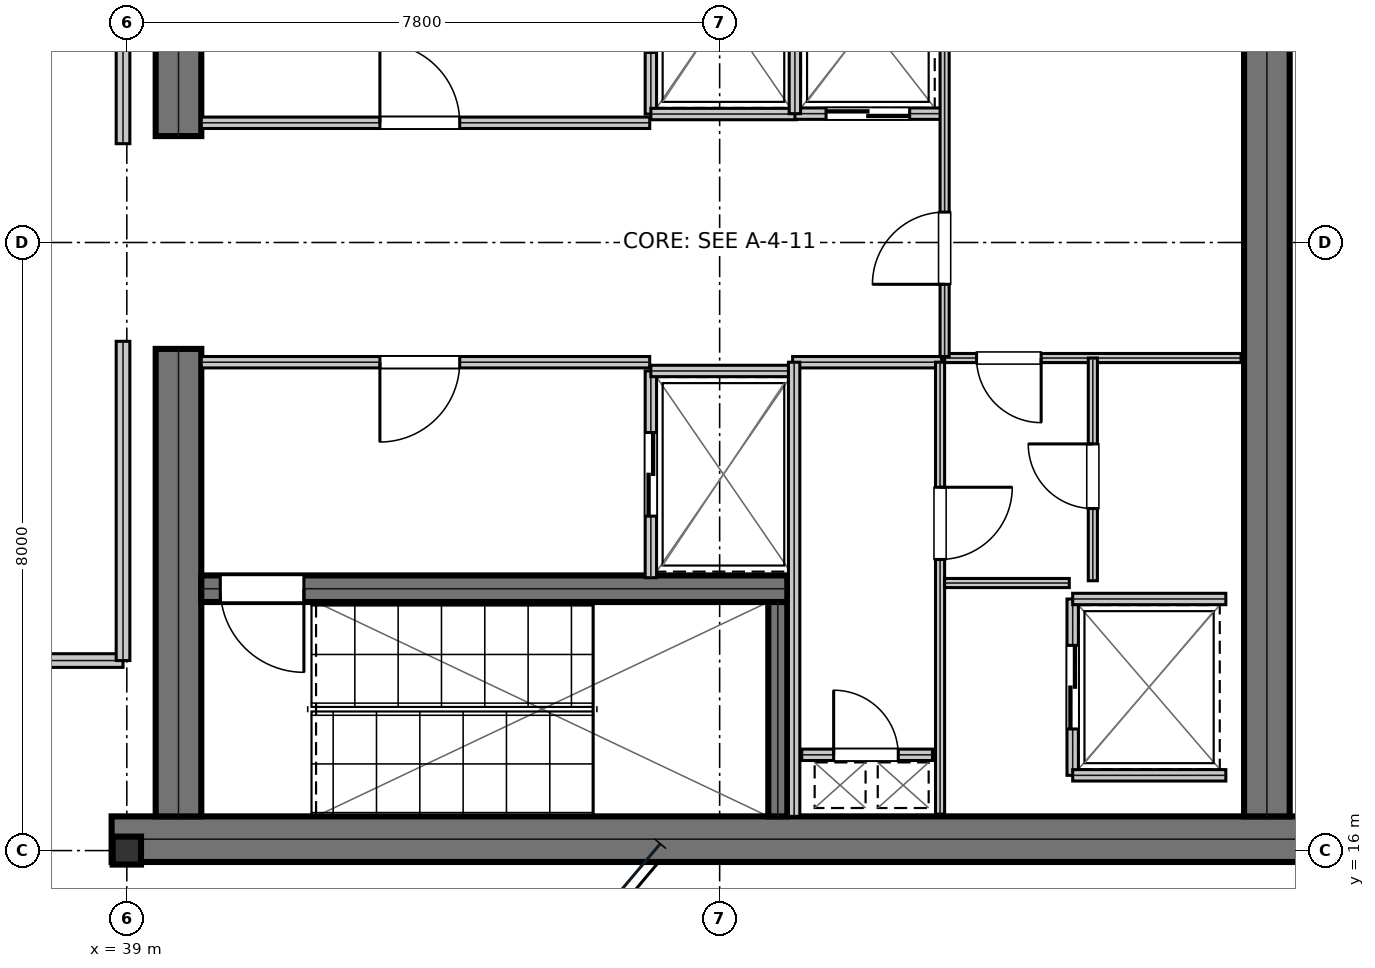
"""IFC4 building model, lengths in metres.
Left out: names, types, materials, properties, quantities, classifications, styles, units other than length and angle.
Written with IfcOpenShell. Run it as: python <this file> out.ifc"""

import sys

from ifc_helpers import new_model, si_unit, direction, frame, frame_2d, origin, origin_2d, place, context, subcontext, project, spatial, rectangle, i_section, extrude, element, fill, save


model = new_model("IFC4")
c1 = context("Model", 3, precision=1e-05, world=origin(), true_north=direction((0.0, 1.0)))
c2 = subcontext(c1, "Body", "Model", "MODEL_VIEW")
j1 = project(units=[si_unit("LENGTHUNIT", "METRE"), si_unit("PLANEANGLEUNIT", "RADIAN")], contexts=[c1])
p1 = place(None, origin())
s1 = spatial("IfcSite", under=j1, at=p1, CompositionType="ELEMENT")
p2 = place(p1, origin())
s2 = spatial("IfcBuilding", under=s1, at=p2, CompositionType="ELEMENT")
p3 = place(p2, frame((0.0, 0.0, 262.05)))
s3 = spatial("IfcBuildingStorey", under=s2, at=p3, CompositionType="ELEMENT", Elevation=262.05)
p4 = place(p3, frame((38.8, 16.15, 0.0), z_axis=(0.0, 0.0, 1.0), x_axis=(1.0, 0.0, 0.0)))
e1 = element("IfcWall", 1, at=p4, inside=s3, PredefinedType="SHEAR", context=c2, shape_type="SweptSolid", body=[
    extrude(rectangle(XDim=16.0, YDim=0.6, at=frame_2d((8.0, 0.0))), origin(), (0.0, 0.0, 1.0), 4.56),
])
for number, where, z_axis, x_axis in (
    (2, (39.68, 16.45, 0.0), (0.0, 0.0, 1.0), (0.0, 1.0, 0.0)),
    (3, (39.68, 25.4, 0.0), (0.0, 0.0, 1.0), (0.0, 1.0, 0.0)),
):
    element("IfcWall", number, at=place(p3, frame(where, z_axis=z_axis, x_axis=x_axis)), inside=s3, PredefinedType="SHEAR", context=c2, shape_type="SweptSolid", body=[
        extrude(rectangle(XDim=6.15, YDim=0.6, at=frame_2d((3.075, 0.0))), origin(), (0.0, 0.0, 1.0), 4.56),
    ])
p5 = place(p3, frame((54.0, 16.45, 0.0), z_axis=(0.0, 0.0, 1.0), x_axis=(0.0, 1.0, 0.0)))
e4 = element("IfcWall", 4, at=p5, inside=s3, PredefinedType="SHEAR", context=c2, shape_type="SweptSolid", body=[
    extrude(rectangle(XDim=15.1, YDim=0.6, at=frame_2d((7.55, 0.0))), origin(), (0.0, 0.0, 1.0), 4.56),
])
p6 = place(p3, frame((39.98, 19.445, 0.0), z_axis=(0.0, 0.0, 1.0), x_axis=(1.0, 0.0, 0.0)))
e5 = element("IfcWall", 5, at=p6, inside=s3, PredefinedType="SHEAR", context=c2, shape_type="SweptSolid", body=[
    extrude(rectangle(XDim=7.71, YDim=0.35, at=frame_2d((3.855, 0.0))), origin(), (0.0, 0.0, 1.0), 4.56),
])
p7 = place(p6, frame((0.25, 0.0, 0.0)))
e6 = element("IfcOpeningElement", 6, at=p7, cuts=e5, PredefinedType="OPENING", context=c2, shape_type="SweptSolid", body=[
    extrude(rectangle(XDim=1.1, YDim=2.15, at=frame_2d((0.55, 1.075))), frame((0.0, 0.185, 0.0), z_axis=(0.0, -1.0, 0.0), x_axis=(1.0, 0.0, 0.0)), (0.0, 0.0, 1.0), 0.37),
])
p8 = place(p3, frame((47.565, 16.45, 0.0), z_axis=(0.0, 0.0, 1.0), x_axis=(0.0, 1.0, 0.0)))
e7 = element("IfcWall", 7, at=p8, inside=s3, PredefinedType="SHEAR", context=c2, shape_type="SweptSolid", body=[
    extrude(rectangle(XDim=2.82, YDim=0.25, at=frame_2d((1.41, 0.0))), origin(), (0.0, 0.0, 1.0), 4.56),
])
p9 = place(p3, frame((39.0, 16.0, 0.0), z_axis=(0.0, 0.0, 1.0), x_axis=(1.0, 0.0, 0.0)))
e8 = element("IfcColumn", 8, at=p9, inside=s3, PredefinedType="COLUMN", context=c2, shape_type="SweptSolid", body=[
    extrude(i_section(OverallWidth=0.373, OverallDepth=0.368, WebThickness=0.015, FlangeThickness=0.024, at=origin_2d()), origin(), (0.0, 0.0, 1.0), 4.794),
])
p10 = place(p3, frame((39.98, 25.575, 0.0), z_axis=(0.0, 0.0, 1.0), x_axis=(1.0, 0.0, 0.0)))
e9 = element("IfcWall", 9, at=p10, inside=s3, PredefinedType="PARTITIONING", context=c2, shape_type="SweptSolid", body=[
    extrude(rectangle(XDim=5.9, YDim=0.15, at=frame_2d((2.95, 0.0))), origin(), (0.0, 0.0, 1.0), 4.56),
])
p11 = place(p10, frame((2.35, 0.0, 0.0)))
e10 = element("IfcOpeningElement", 10, at=p11, cuts=e9, PredefinedType="OPENING", context=c2, shape_type="SweptSolid", body=[
    extrude(rectangle(XDim=1.05, YDim=2.15, at=frame_2d((0.525, 1.075))), frame((0.0, 0.085, 0.0), z_axis=(0.0, -1.0, 0.0), x_axis=(1.0, 0.0, 0.0)), (0.0, 0.0, 1.0), 0.17),
])
p12 = place(p3, frame((39.98, 22.425, 0.0), z_axis=(0.0, 0.0, 1.0), x_axis=(1.0, 0.0, 0.0)))
e11 = element("IfcWall", 11, at=p12, inside=s3, PredefinedType="PARTITIONING", context=c2, shape_type="SweptSolid", body=[
    extrude(rectangle(XDim=5.9, YDim=0.15, at=frame_2d((2.95, 0.0))), origin(), (0.0, 0.0, 1.0), 4.56),
])
p13 = place(p12, frame((2.35, 0.0, 0.0)))
e12 = element("IfcOpeningElement", 12, at=p13, cuts=e11, PredefinedType="OPENING", context=c2, shape_type="SweptSolid", body=[
    extrude(rectangle(XDim=1.05, YDim=2.15, at=frame_2d((0.525, 1.075))), frame((0.0, 0.085, 0.0), z_axis=(0.0, -1.0, 0.0), x_axis=(1.0, 0.0, 0.0)), (0.0, 0.0, 1.0), 0.17),
])
p14 = place(p3, frame((45.895, 25.69, 0.0), z_axis=(0.0, 0.0, 1.0), x_axis=(0.0, 1.0, 0.0)))
e13 = element("IfcWall", 13, at=p14, inside=s3, PredefinedType="PARTITIONING", context=c2, shape_type="SweptSolid", body=[
    extrude(rectangle(XDim=2.72, YDim=0.15, at=frame_2d((1.36, 0.0))), origin(), (0.0, 0.0, 1.0), 4.56),
])
p15 = place(p14, frame((0.81, 0.0, 0.0)))
e14 = element("IfcOpeningElement", 14, at=p15, cuts=e13, PredefinedType="OPENING", context=c2, shape_type="SweptSolid", body=[
    extrude(rectangle(XDim=1.1, YDim=2.15, at=frame_2d((0.55, 1.075))), frame((0.0, 0.085, 0.0), z_axis=(0.0, -1.0, 0.0), x_axis=(1.0, 0.0, 0.0)), (0.0, 0.0, 1.0), 0.17),
])
p16 = place(p3, frame((45.895, 25.69, 0.0), z_axis=(0.0, 0.0, 1.0), x_axis=(1.0, 0.0, 0.0)))
e15 = element("IfcWall", 15, at=p16, inside=s3, PredefinedType="PARTITIONING", context=c2, shape_type="SweptSolid", body=[
    extrude(rectangle(XDim=1.915, YDim=0.15, at=frame_2d((0.958, 0.0))), origin(), (0.0, 0.0, 1.0), 4.56),
])
p17 = place(p3, frame((45.895, 19.59, 0.0), z_axis=(0.0, 0.0, 1.0), x_axis=(0.0, 1.0, 0.0)))
e16 = element("IfcWall", 16, at=p17, inside=s3, PredefinedType="PARTITIONING", context=c2, shape_type="SweptSolid", body=[
    extrude(rectangle(XDim=2.72, YDim=0.15, at=frame_2d((1.36, 0.0))), origin(), (0.0, 0.0, 1.0), 4.56),
])
p18 = place(p17, frame((0.81, 0.0, 0.0)))
e17 = element("IfcOpeningElement", 17, at=p18, cuts=e16, PredefinedType="OPENING", context=c2, shape_type="SweptSolid", body=[
    extrude(rectangle(XDim=1.1, YDim=2.15, at=frame_2d((0.55, 1.075))), frame((0.0, 0.085, 0.0), z_axis=(0.0, -1.0, 0.0), x_axis=(1.0, 0.0, 0.0)), (0.0, 0.0, 1.0), 0.17),
])
p19 = place(p3, frame((45.895, 22.31, 0.0), z_axis=(0.0, 0.0, 1.0), x_axis=(1.0, 0.0, 0.0)))
e18 = element("IfcWall", 18, at=p19, inside=s3, PredefinedType="PARTITIONING", context=c2, shape_type="SweptSolid", body=[
    extrude(rectangle(XDim=1.915, YDim=0.15, at=frame_2d((0.958, 0.0))), origin(), (0.0, 0.0, 1.0), 4.56),
])
p20 = place(p3, frame((47.79, 25.695, 0.0), z_axis=(0.0, 0.0, 1.0), x_axis=(1.0, 0.0, 0.0)))
e19 = element("IfcWall", 19, at=p20, inside=s3, PredefinedType="PARTITIONING", context=c2, shape_type="SweptSolid", body=[
    extrude(rectangle(XDim=1.92, YDim=0.15, at=frame_2d((0.96, 0.0))), origin(), (0.0, 0.0, 1.0), 4.56),
])
p21 = place(p20, frame((0.41, 0.0, 0.0)))
e20 = element("IfcOpeningElement", 20, at=p21, cuts=e19, PredefinedType="OPENING", context=c2, shape_type="SweptSolid", body=[
    extrude(rectangle(XDim=1.1, YDim=2.15, at=frame_2d((0.55, 1.075))), frame((0.0, 0.085, 0.0), z_axis=(0.0, -1.0, 0.0), x_axis=(1.0, 0.0, 0.0)), (0.0, 0.0, 1.0), 0.17),
])
p22 = place(p3, frame((47.79, 25.695, 0.0), z_axis=(0.0, 0.0, 1.0), x_axis=(0.0, 1.0, 0.0)))
e21 = element("IfcWall", 21, at=p22, inside=s3, PredefinedType="PARTITIONING", context=c2, shape_type="SweptSolid", body=[
    extrude(rectangle(XDim=2.415, YDim=0.15, at=frame_2d((1.208, 0.0))), origin(), (0.0, 0.0, 1.0), 4.56),
])
p23 = place(p3, frame((51.445, 16.99, 0.0), z_axis=(0.0, 0.0, 1.0), x_axis=(0.0, 1.0, 0.0)))
e22 = element("IfcWall", 22, at=p23, inside=s3, PredefinedType="PARTITIONING", context=c2, shape_type="SweptSolid", body=[
    extrude(rectangle(XDim=2.32, YDim=0.15, at=frame_2d((1.16, 0.0))), origin(), (0.0, 0.0, 1.0), 4.56),
])
p24 = place(p23, frame((0.61, 0.0, 0.0)))
e23 = element("IfcOpeningElement", 23, at=p24, cuts=e22, PredefinedType="OPENING", context=c2, shape_type="SweptSolid", body=[
    extrude(rectangle(XDim=1.1, YDim=2.15, at=frame_2d((0.55, 1.075))), frame((0.0, 0.085, 0.0), z_axis=(0.0, -1.0, 0.0), x_axis=(1.0, 0.0, 0.0)), (0.0, 0.0, 1.0), 0.17),
])
for number, where, z_axis, x_axis in (
    (24, (51.445, 16.99, 0.0), (0.0, 0.0, 1.0), (1.0, 0.0, 0.0)),
    (25, (51.445, 19.31, 0.0), (0.0, 0.0, 1.0), (1.0, 0.0, 0.0)),
):
    element("IfcWall", number, at=place(p3, frame(where, z_axis=z_axis, x_axis=x_axis)), inside=s3, PredefinedType="PARTITIONING", context=c2, shape_type="SweptSolid", body=[
        extrude(rectangle(XDim=2.015, YDim=0.15, at=frame_2d((1.007, 0.0))), origin(), (0.0, 0.0, 1.0), 4.56),
    ])
p25 = place(p3, frame((47.88, 17.26, 0.0), z_axis=(0.0, 0.0, 1.0), x_axis=(1.0, 0.0, 0.0)))
e26 = element("IfcWall", 26, at=p25, inside=s3, PredefinedType="PARTITIONING", context=c2, shape_type="SweptSolid", body=[
    extrude(rectangle(XDim=1.72, YDim=0.15, at=frame_2d((0.86, 0.0))), origin(), (0.0, 0.0, 1.0), 4.56),
])
p26 = place(p25, frame((0.42, 0.0, 0.0)))
e27 = element("IfcOpeningElement", 27, at=p26, cuts=e26, PredefinedType="OPENING", context=c2, shape_type="SweptSolid", body=[
    extrude(rectangle(XDim=0.85, YDim=2.15, at=frame_2d((0.425, 1.075))), frame((0.0, 0.085, 0.0), z_axis=(0.0, -1.0, 0.0), x_axis=(1.0, 0.0, 0.0)), (0.0, 0.0, 1.0), 0.17),
])
p27 = place(p3, frame((47.76, 22.425, 0.0), z_axis=(0.0, 0.0, 1.0), x_axis=(1.0, 0.0, 0.0)))
e28 = element("IfcWall", 28, at=p27, inside=s3, PredefinedType="PARTITIONING", context=c2, shape_type="SweptSolid", body=[
    extrude(rectangle(XDim=1.96, YDim=0.15, at=frame_2d((0.98, 0.0))), origin(), (0.0, 0.0, 1.0), 4.56),
])
p28 = place(p3, frame((47.78, 16.45, 0.0), z_axis=(0.0, 0.0, 1.0), x_axis=(0.0, 1.0, 0.0)))
e29 = element("IfcWall", 29, at=p28, inside=s3, PredefinedType="PARTITIONING", context=c2, shape_type="SweptSolid", body=[
    extrude(rectangle(XDim=5.975, YDim=0.15, at=frame_2d((2.988, 0.0))), origin(), (0.0, 0.0, 1.0), 4.56),
])
p29 = place(p3, frame((49.7, 16.48, 0.0), z_axis=(0.0, 0.0, 1.0), x_axis=(0.0, 1.0, 0.0)))
e30 = element("IfcWall", 30, at=p29, inside=s3, PredefinedType="PARTITIONING", context=c2, shape_type="SweptSolid", body=[
    extrude(rectangle(XDim=5.945, YDim=0.12, at=frame_2d((2.973, 0.0))), origin(), (0.0, 0.0, 1.0), 4.56),
])
p30 = place(p29, frame((3.35, 0.0, 0.0)))
e31 = element("IfcOpeningElement", 31, at=p30, cuts=e30, PredefinedType="OPENING", context=c2, shape_type="SweptSolid", body=[
    extrude(rectangle(XDim=0.95, YDim=2.15, at=frame_2d((0.475, 1.075))), frame((0.0, 0.07, 0.0), z_axis=(0.0, -1.0, 0.0), x_axis=(1.0, 0.0, 0.0)), (0.0, 0.0, 1.0), 0.14),
])
p31 = place(p3, frame((49.76, 22.48, 0.0), z_axis=(0.0, 0.0, 1.0), x_axis=(1.0, 0.0, 0.0)))
e32 = element("IfcWall", 32, at=p31, inside=s3, PredefinedType="PARTITIONING", context=c2, shape_type="SweptSolid", body=[
    extrude(rectangle(XDim=3.9, YDim=0.12, at=frame_2d((1.95, 0.0))), origin(), (0.0, 0.0, 1.0), 4.56),
])
p32 = place(p31, frame((0.42, 0.0, 0.0)))
e33 = element("IfcOpeningElement", 33, at=p32, cuts=e32, PredefinedType="OPENING", context=c2, shape_type="SweptSolid", body=[
    extrude(rectangle(XDim=0.85, YDim=2.15, at=frame_2d((0.425, 1.075))), frame((0.0, 0.07, 0.0), z_axis=(0.0, -1.0, 0.0), x_axis=(1.0, 0.0, 0.0)), (0.0, 0.0, 1.0), 0.14),
])
p33 = place(p3, frame((51.71, 19.55, 0.0), z_axis=(0.0, 0.0, 1.0), x_axis=(0.0, 1.0, 0.0)))
e34 = element("IfcWall", 34, at=p33, inside=s3, PredefinedType="PARTITIONING", context=c2, shape_type="SweptSolid", body=[
    extrude(rectangle(XDim=2.93, YDim=0.12, at=frame_2d((1.465, 0.0))), origin(), (0.0, 0.0, 1.0), 4.56),
])
p34 = place(p33, frame((0.95, 0.0, 0.0)))
e35 = element("IfcOpeningElement", 35, at=p34, cuts=e34, PredefinedType="OPENING", context=c2, shape_type="SweptSolid", body=[
    extrude(rectangle(XDim=0.85, YDim=2.15, at=frame_2d((0.425, 1.075))), frame((0.0, 0.07, 0.0), z_axis=(0.0, -1.0, 0.0), x_axis=(1.0, 0.0, 0.0)), (0.0, 0.0, 1.0), 0.14),
])
p35 = place(p3, frame((49.76, 19.52, 0.0), z_axis=(0.0, 0.0, 1.0), x_axis=(1.0, 0.0, 0.0)))
e36 = element("IfcWall", 36, at=p35, inside=s3, PredefinedType="PARTITIONING", context=c2, shape_type="SweptSolid", body=[
    extrude(rectangle(XDim=1.64, YDim=0.12, at=frame_2d((0.82, 0.0))), origin(), (0.0, 0.0, 1.0), 4.56),
])
p36 = place(p3, frame((49.76, 22.5, 0.0), z_axis=(0.0, 0.0, 1.0), x_axis=(0.0, 1.0, 0.0)))
e37 = element("IfcWall", 37, at=p36, inside=s3, PredefinedType="PARTITIONING", context=c2, shape_type="SweptSolid", body=[
    extrude(rectangle(XDim=5.72, YDim=0.12, at=frame_2d((2.86, 0.0))), origin(), (0.0, 0.0, 1.0), 4.56),
])
p37 = place(p36, frame((0.95, 0.0, 0.0)))
e38 = element("IfcOpeningElement", 38, at=p37, cuts=e37, PredefinedType="OPENING", context=c2, shape_type="SweptSolid", body=[
    extrude(rectangle(XDim=0.95, YDim=2.15, at=frame_2d((0.475, 1.075))), frame((0.0, 0.07, 0.0), z_axis=(0.0, -1.0, 0.0), x_axis=(1.0, 0.0, 0.0)), (0.0, 0.0, 1.0), 0.14),
])
p38 = place(p3, frame((27.204, 18.5, 0.0), z_axis=(0.0, 0.0, 1.0), x_axis=(1.0, 0.0, 0.0)))
e39 = element("IfcWall", 39, at=p38, inside=s3, PredefinedType="SOLIDWALL", context=c2, shape_type="SweptSolid", body=[
    extrude(rectangle(XDim=11.746, YDim=0.18, at=frame_2d((5.873, 0.0))), origin(), (0.0, 0.0, 1.0), 4.02),
])
p39 = place(p38, frame((5.373, 0.0, 0.0)))
e40 = element("IfcOpeningElement", 40, at=p39, cuts=e39, PredefinedType="OPENING", context=c2, shape_type="SweptSolid", body=[
    extrude(rectangle(XDim=1.0, YDim=2.15, at=frame_2d((0.5, 1.075))), frame((0.0, 0.1, 0.0), z_axis=(0.0, -1.0, 0.0), x_axis=(1.0, 0.0, 0.0)), (0.0, 0.0, 1.0), 0.2),
])
for number, where, z_axis, x_axis in (
    (41, (38.95, 18.5, 0.0), (0.0, 0.0, 1.0), (0.0, 1.0, 0.0)),
    (42, (38.95, 25.3, 0.0), (0.0, 0.0, 1.0), (0.0, 1.0, 0.0)),
):
    element("IfcWall", number, at=place(p3, frame(where, z_axis=z_axis, x_axis=x_axis)), inside=s3, PredefinedType="SOLIDWALL", context=c2, shape_type="SweptSolid", body=[
        extrude(rectangle(XDim=4.2, YDim=0.18, at=frame_2d((2.1, 0.0))), origin(), (0.0, 0.0, 1.0), 4.29),
    ])
p40 = place(p11, origin())
e43 = element("IfcDoor", 43, at=p40, inside=s3, OperationType="SINGLE_SWING_LEFT", PredefinedType="DOOR", context=c2, shape_type="SweptSolid", body=[
    extrude(rectangle(XDim=1.05, YDim=2.15, at=frame_2d((0.525, 1.075))), frame((0.0, 0.025, 0.0), z_axis=(0.0, -1.0, 0.0), x_axis=(1.0, 0.0, 0.0)), (0.0, 0.0, 1.0), 0.05),
])
fill(e10, e43)
p41 = place(p13, frame((1.05, 0.0, 0.0), z_axis=(0.0, 0.0, 1.0), x_axis=(-1.0, 0.0, 0.0)))
e44 = element("IfcDoor", 44, at=p41, inside=s3, OperationType="SINGLE_SWING_RIGHT", PredefinedType="DOOR", context=c2, shape_type="SweptSolid", body=[
    extrude(rectangle(XDim=1.05, YDim=2.15, at=frame_2d((0.525, 1.075))), frame((0.0, 0.025, 0.0), z_axis=(0.0, -1.0, 0.0), x_axis=(1.0, 0.0, 0.0)), (0.0, 0.0, 1.0), 0.05),
])
fill(e12, e44)
p42 = place(p18, frame((1.1, 0.0, 0.0), z_axis=(0.0, 0.0, 1.0), x_axis=(-1.0, 0.0, 0.0)))
e45 = element("IfcDoor", 45, at=p42, inside=s3, OperationType="DOUBLE_DOOR_SLIDING", PredefinedType="DOOR", context=c2, shape_type="SweptSolid", body=[
    extrude(rectangle(XDim=1.1, YDim=2.15, at=frame_2d((0.55, 1.075))), frame((0.0, 0.025, 0.0), z_axis=(0.0, -1.0, 0.0), x_axis=(1.0, 0.0, 0.0)), (0.0, 0.0, 1.0), 0.05),
])
fill(e17, e45)
p43 = place(p21, frame((1.1, 0.0, 0.0), z_axis=(0.0, 0.0, 1.0), x_axis=(-1.0, 0.0, 0.0)))
e46 = element("IfcDoor", 46, at=p43, inside=s3, OperationType="DOUBLE_DOOR_SLIDING", PredefinedType="DOOR", context=c2, shape_type="SweptSolid", body=[
    extrude(rectangle(XDim=1.1, YDim=2.15, at=frame_2d((0.55, 1.075))), frame((0.0, 0.025, 0.0), z_axis=(0.0, -1.0, 0.0), x_axis=(1.0, 0.0, 0.0)), (0.0, 0.0, 1.0), 0.05),
])
fill(e20, e46)
p44 = place(p24, frame((1.1, 0.0, 0.0), z_axis=(0.0, 0.0, 1.0), x_axis=(-1.0, 0.0, 0.0)))
e47 = element("IfcDoor", 47, at=p44, inside=s3, OperationType="DOUBLE_DOOR_SLIDING", PredefinedType="DOOR", context=c2, shape_type="SweptSolid", body=[
    extrude(rectangle(XDim=1.1, YDim=2.15, at=frame_2d((0.55, 1.075))), frame((0.0, 0.025, 0.0), z_axis=(0.0, -1.0, 0.0), x_axis=(1.0, 0.0, 0.0)), (0.0, 0.0, 1.0), 0.05),
])
fill(e23, e47)
p45 = place(p26, origin())
e48 = element("IfcDoor", 48, at=p45, inside=s3, OperationType="SINGLE_SWING_LEFT", PredefinedType="TRAPDOOR", context=c2, shape_type="SweptSolid", body=[
    extrude(rectangle(XDim=0.85, YDim=2.15, at=frame_2d((0.425, 1.075))), frame((0.0, 0.025, 0.0), z_axis=(0.0, -1.0, 0.0), x_axis=(1.0, 0.0, 0.0)), (0.0, 0.0, 1.0), 0.05),
])
fill(e27, e48)
p46 = place(p30, frame((0.95, 0.0, 0.0), z_axis=(0.0, 0.0, 1.0), x_axis=(-1.0, 0.0, 0.0)))
e49 = element("IfcDoor", 49, at=p46, inside=s3, OperationType="SINGLE_SWING_LEFT", PredefinedType="DOOR", context=c2, shape_type="SweptSolid", body=[
    extrude(rectangle(XDim=0.95, YDim=2.15, at=frame_2d((0.475, 1.075))), frame((0.0, 0.025, 0.0), z_axis=(0.0, -1.0, 0.0), x_axis=(1.0, 0.0, 0.0)), (0.0, 0.0, 1.0), 0.05),
])
fill(e31, e49)
p47 = place(p32, frame((0.85, 0.0, 0.0), z_axis=(0.0, 0.0, 1.0), x_axis=(-1.0, 0.0, 0.0)))
e50 = element("IfcDoor", 50, at=p47, inside=s3, OperationType="SINGLE_SWING_LEFT", PredefinedType="DOOR", context=c2, shape_type="SweptSolid", body=[
    extrude(rectangle(XDim=0.85, YDim=2.15, at=frame_2d((0.425, 1.075))), frame((0.0, 0.025, 0.0), z_axis=(0.0, -1.0, 0.0), x_axis=(1.0, 0.0, 0.0)), (0.0, 0.0, 1.0), 0.05),
])
fill(e33, e50)
p48 = place(p34, origin())
e51 = element("IfcDoor", 51, at=p48, inside=s3, OperationType="SINGLE_SWING_RIGHT", PredefinedType="DOOR", context=c2, shape_type="SweptSolid", body=[
    extrude(rectangle(XDim=0.85, YDim=2.15, at=frame_2d((0.425, 1.075))), frame((0.0, 0.025, 0.0), z_axis=(0.0, -1.0, 0.0), x_axis=(1.0, 0.0, 0.0)), (0.0, 0.0, 1.0), 0.05),
])
fill(e35, e51)
p49 = place(p37, origin())
e52 = element("IfcDoor", 52, at=p49, inside=s3, OperationType="SINGLE_SWING_LEFT", PredefinedType="DOOR", context=c2, shape_type="SweptSolid", body=[
    extrude(rectangle(XDim=0.95, YDim=2.15, at=frame_2d((0.475, 1.075))), frame((0.0, 0.025, 0.0), z_axis=(0.0, -1.0, 0.0), x_axis=(1.0, 0.0, 0.0)), (0.0, 0.0, 1.0), 0.05),
])
fill(e38, e52)
p50 = place(p7, frame((1.1, 0.0, 0.0), z_axis=(0.0, 0.0, 1.0), x_axis=(-1.0, 0.0, 0.0)))
e53 = element("IfcDoor", 53, at=p50, inside=s3, OperationType="SINGLE_SWING_LEFT", PredefinedType="DOOR", context=c2, shape_type="SweptSolid", body=[
    extrude(rectangle(XDim=1.1, YDim=2.15, at=frame_2d((0.55, 1.075))), frame((0.0, 0.025, 0.0), z_axis=(0.0, -1.0, 0.0), x_axis=(1.0, 0.0, 0.0)), (0.0, 0.0, 1.0), 0.05),
])
fill(e6, e53)
save(model, sys.argv[1])
